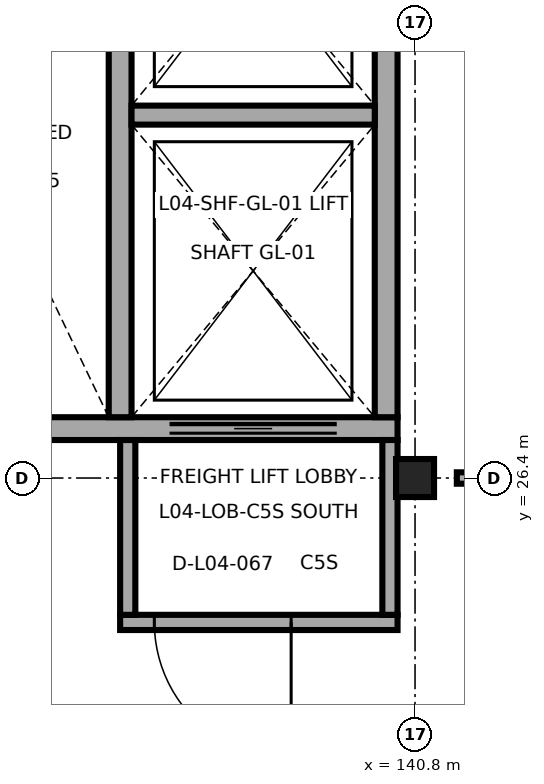
"""IFC4 building model, lengths in metres.
Left out: names, types, materials, properties, quantities, classifications, styles, units other than length and angle.
Written with IfcOpenShell. Run it as: python <this file> out.ifc"""

import sys

from ifc_helpers import new_model, si_unit, direction, frame, frame_2d, origin, origin_2d, place, context, subcontext, project, spatial, rectangle, extrude, element, fill, save


model = new_model("IFC4")
c1 = context("Model", 3, precision=1e-05, world=origin(), true_north=direction((0.0, 1.0)))
c2 = subcontext(c1, "Body", "Model", "MODEL_VIEW")
j1 = project(units=[si_unit("LENGTHUNIT", "METRE"), si_unit("PLANEANGLEUNIT", "RADIAN")], contexts=[c1])
p1 = place(None, origin())
s1 = spatial("IfcSite", under=j1, at=p1, CompositionType="ELEMENT")
p2 = place(p1, origin())
s2 = spatial("IfcBuilding", under=s1, at=p2, CompositionType="ELEMENT")
p3 = place(p2, frame((0.0, 0.0, 21.9)))
s3 = spatial("IfcBuildingStorey", under=s2, at=p3, CompositionType="ELEMENT", Elevation=21.9)
p4 = place(p3, frame((140.8, 26.4, 0.0), z_axis=(0.0, 0.0, 1.0), x_axis=(1.0, 0.0, 0.0)))
e1 = element("IfcColumn", 1, at=p4, inside=s3, PredefinedType="COLUMN", context=c2, shape_type="SweptSolid", body=[
    extrude(rectangle(XDim=0.5, YDim=0.5, at=origin_2d()), origin(), (0.0, 0.0, 1.0), 4.5),
])
p5 = place(p3, frame((132.63, 27.05, 0.0), z_axis=(0.0, 0.0, 1.0), x_axis=(1.0, 0.0, 0.0)))
e2 = element("IfcWall", 2, at=p5, inside=s3, PredefinedType="SHEAR", context=c2, shape_type="SweptSolid", body=[
    extrude(rectangle(XDim=7.94, YDim=0.3, at=frame_2d((3.97, 0.0))), origin(), (0.0, 0.0, 1.0), 4.25),
])
p6 = place(p5, frame((4.94, 0.0, 0.0)))
e3 = element("IfcOpeningElement", 3, at=p6, cuts=e2, PredefinedType="OPENING", context=c2, shape_type="SweptSolid", body=[
    extrude(rectangle(XDim=2.2, YDim=2.6, at=frame_2d((1.1, 1.3))), frame((0.0, 0.16, 0.0), z_axis=(0.0, -1.0, 0.0), x_axis=(1.0, 0.0, 0.0)), (0.0, 0.0, 1.0), 0.32),
])
for number, where, z_axis, x_axis in (
    (4, (140.42, 27.2, 0.0), (0.0, 0.0, 1.0), (0.0, 1.0, 0.0)),
    (5, (136.92, 27.2, 0.0), (0.0, 0.0, 1.0), (0.0, 1.0, 0.0)),
):
    element("IfcWall", number, at=place(p3, frame(where, z_axis=z_axis, x_axis=x_axis)), inside=s3, PredefinedType="SHEAR", context=c2, shape_type="SweptSolid", body=[
        extrude(rectangle(XDim=8.0, YDim=0.3, at=frame_2d((4.0, 0.0))), origin(), (0.0, 0.0, 1.0), 4.25),
    ])
p7 = place(p3, frame((137.07, 31.175, 0.0), z_axis=(0.0, 0.0, 1.0), x_axis=(1.0, 0.0, 0.0)))
e6 = element("IfcWall", 6, at=p7, inside=s3, PredefinedType="SHEAR", context=c2, shape_type="SweptSolid", body=[
    extrude(rectangle(XDim=3.2, YDim=0.25, at=frame_2d((1.6, 0.0))), origin(), (0.0, 0.0, 1.0), 4.25),
])
p8 = place(p3, frame((140.57, 24.5, 0.0), z_axis=(0.0, 0.0, 1.0), x_axis=(-1.0, 0.0, 0.0)))
e7 = element("IfcWall", 7, at=p8, inside=s3, PredefinedType="SOLIDWALL", context=c2, shape_type="SweptSolid", body=[
    extrude(rectangle(XDim=3.65, YDim=0.2, at=frame_2d((1.825, 0.0))), origin(), (0.0, 0.0, 1.0), 4.235),
])
p9 = place(p8, frame((1.4, 0.0, 0.0)))
e8 = element("IfcOpeningElement", 8, at=p9, cuts=e7, PredefinedType="OPENING", context=c2, shape_type="SweptSolid", body=[
    extrude(rectangle(XDim=1.8, YDim=2.2, at=frame_2d((0.9, 1.1))), frame((0.0, 0.11, 0.0), z_axis=(0.0, -1.0, 0.0), x_axis=(1.0, 0.0, 0.0)), (0.0, 0.0, 1.0), 0.22),
])
for number, where, z_axis, x_axis in (
    (9, (137.02, 24.6, 0.0), (0.0, 0.0, 1.0), (0.0, 1.0, 0.0)),
    (10, (140.47, 26.9, 0.0), (0.0, 0.0, 1.0), (0.0, -1.0, 0.0)),
):
    element("IfcWall", number, at=place(p3, frame(where, z_axis=z_axis, x_axis=x_axis)), inside=s3, PredefinedType="SOLIDWALL", context=c2, shape_type="SweptSolid", body=[
        extrude(rectangle(XDim=2.3, YDim=0.2, at=frame_2d((1.15, 0.0))), origin(), (0.0, 0.0, 1.0), 3.682),
    ])
p10 = place(p3, frame((141.35, 26.4, 0.0), z_axis=(0.0, 0.0, 1.0), x_axis=(1.0, 0.0, 0.0)))
e11 = element("IfcWall", 11, at=p10, inside=s3, PredefinedType="PARTITIONING", context=c2, shape_type="SweptSolid", body=[
    extrude(rectangle(XDim=7.3, YDim=0.15, at=frame_2d((3.65, 0.0))), origin(), (0.0, 0.0, 1.0), 3.682),
])
p11 = place(p10, frame((3.175, 0.0, 0.0)))
e12 = element("IfcOpeningElement", 12, at=p11, cuts=e11, PredefinedType="OPENING", context=c2, shape_type="SweptSolid", body=[
    extrude(rectangle(XDim=0.95, YDim=2.15, at=frame_2d((0.475, 1.075))), frame((0.0, 0.085, 0.0), z_axis=(0.0, -1.0, 0.0), x_axis=(1.0, 0.0, 0.0)), (0.0, 0.0, 1.0), 0.17),
])
p12 = place(p6, origin())
e13 = element("IfcDoor", 13, at=p12, inside=s3, OperationType="SLIDING_TO_LEFT", PredefinedType="DOOR", context=c2, shape_type="SweptSolid", body=[
    extrude(rectangle(XDim=2.2, YDim=2.6, at=frame_2d((1.1, 1.3))), frame((0.0, 0.025, 0.0), z_axis=(0.0, -1.0, 0.0), x_axis=(1.0, 0.0, 0.0)), (0.0, 0.0, 1.0), 0.05),
])
fill(e3, e13)
p13 = place(p9, origin())
e14 = element("IfcDoor", 14, at=p13, inside=s3, OperationType="DOUBLE_DOOR_SINGLE_SWING", PredefinedType="DOOR", context=c2, shape_type="SweptSolid", body=[
    extrude(rectangle(XDim=1.8, YDim=2.2, at=frame_2d((0.9, 1.1))), frame((0.0, 0.025, 0.0), z_axis=(0.0, -1.0, 0.0), x_axis=(1.0, 0.0, 0.0)), (0.0, 0.0, 1.0), 0.05),
])
fill(e8, e14)
save(model, sys.argv[1])
